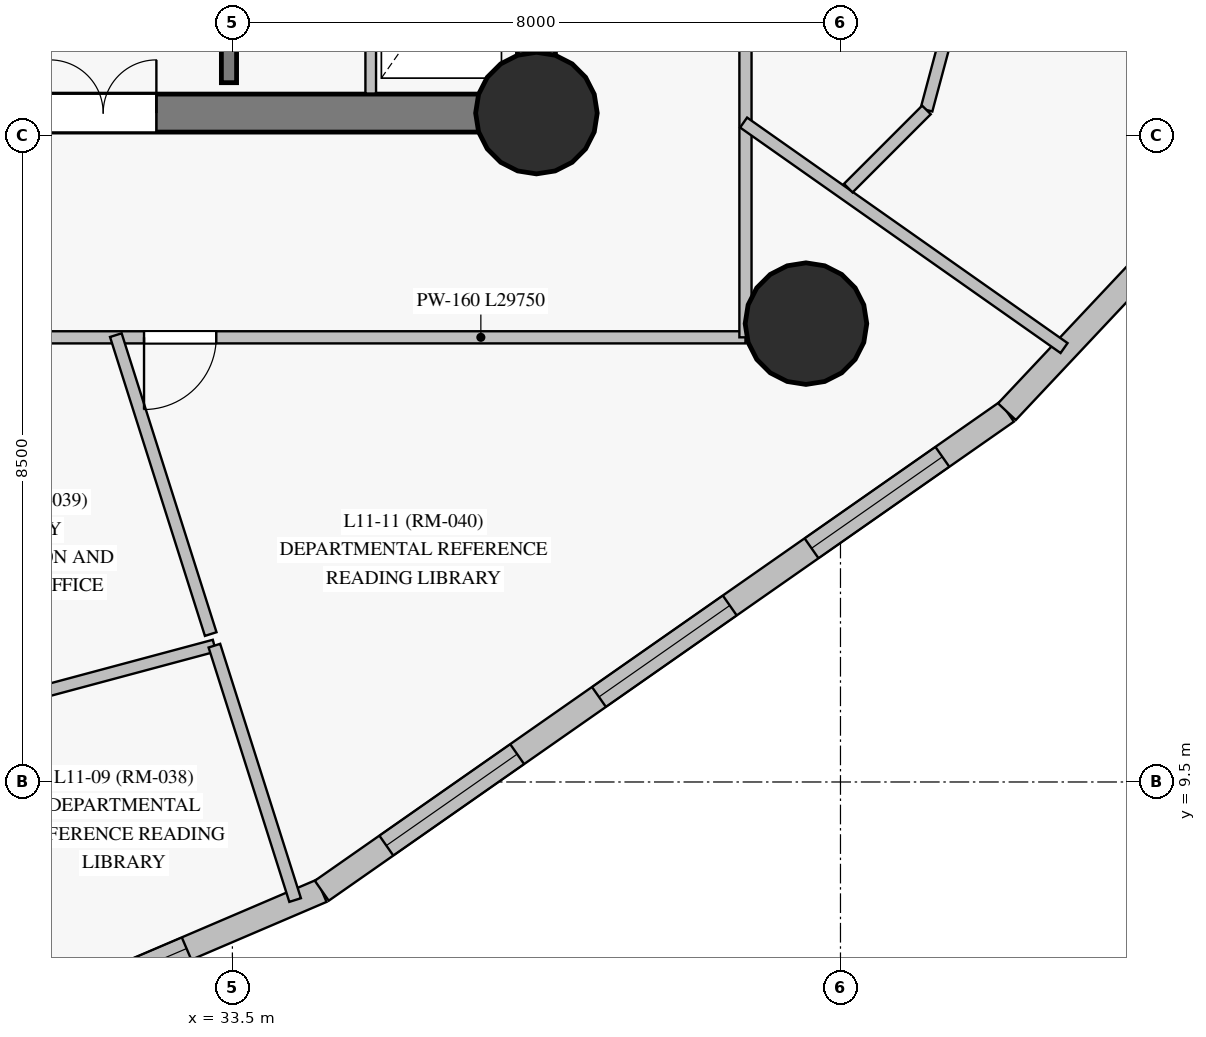
"""IFC4 building model, lengths in metres.
Left out: names, types, materials, properties, quantities, classifications, styles, units other than length and angle.
Written with IfcOpenShell. Run it as: python <this file> out.ifc"""

import sys

from ifc_helpers import new_model, si_unit, direction, frame, frame_2d, origin, origin_with_axes, origin_2d, place, context, subcontext, project, spatial, rectangle, circle, extrude, source, transform, mapped, element, fill, save


model = new_model("IFC4")
c1 = context("Model", 3, precision=1e-05, world=origin(), true_north=direction((0.0, 1.0)))
c2 = subcontext(c1, "Body", "Model", "MODEL_VIEW")
j1 = project(units=[si_unit("LENGTHUNIT", "METRE"), si_unit("PLANEANGLEUNIT", "RADIAN")], contexts=[c1])
p1 = place(None, origin())
s1 = spatial("IfcSite", under=j1, at=p1, CompositionType="ELEMENT")
p2 = place(p1, origin())
s2 = spatial("IfcBuilding", under=s1, at=p2, CompositionType="ELEMENT")
p3 = place(p2, frame((0.0, 0.0, 44.5)))
s3 = spatial("IfcBuildingStorey", under=s2, at=p3, CompositionType="ELEMENT", Elevation=44.5)
p4 = place(p3, frame((26.55, 18.3, 0.0), z_axis=(0.0, 0.0, 1.0), x_axis=(1.0, 0.0, 0.0)))
e1 = element("IfcWall", 1, at=p4, inside=s3, PredefinedType="SHEAR", context=c2, shape_type="SweptSolid", body=[
    extrude(rectangle(XDim=10.95, YDim=0.5, at=frame_2d((5.475, 0.0))), origin(), (0.0, 0.0, 1.0), 3.35),
])
p5 = place(p4, frame((4.55, 0.0, 0.0)))
e2 = element("IfcOpeningElement", 2, at=p5, cuts=e1, PredefinedType="OPENING", context=c2, shape_type="SweptSolid", body=[
    extrude(rectangle(XDim=1.4, YDim=2.2, at=frame_2d((0.7, 1.1))), frame((0.0, 0.26, 0.0), z_axis=(0.0, -1.0, 0.0), x_axis=(1.0, 0.0, 0.0)), (0.0, 0.0, 1.0), 0.52),
])
p6 = place(p3, frame((37.5, 18.3, 0.0), z_axis=(0.0, 0.0, 1.0), x_axis=(0.0, 1.0, 0.0)))
e3 = element("IfcWall", 3, at=p6, inside=s3, PredefinedType="SHEAR", context=c2, shape_type="SweptSolid", body=[
    extrude(rectangle(XDim=16.4, YDim=0.5, at=frame_2d((8.2, 0.0))), origin(), (0.0, 0.0, 1.0), 3.35),
])
p7 = place(p6, frame((14.06, 0.0, 0.0)))
e4 = element("IfcOpeningElement", 4, at=p7, cuts=e3, PredefinedType="OPENING", context=c2, shape_type="SweptSolid", body=[
    extrude(rectangle(XDim=1.2, YDim=2.15, at=frame_2d((0.6, 1.075))), frame((0.0, 0.26, 0.0), z_axis=(0.0, -1.0, 0.0), x_axis=(1.0, 0.0, 0.0)), (0.0, 0.0, 1.0), 0.52),
])
m1 = source(origin_with_axes(), c2, "Body", "SweptSolid", [
    extrude(circle(Radius=0.8, at=origin_2d()), origin(), (0.0, 0.0, 1.0), 3.6),
])
for number, where, z_axis, x_axis in (
    (5, (37.5, 18.3, 0.0), (0.0, 0.0, 1.0), (1.0, 0.0, 0.0)),
    (6, (41.046, 15.53, 0.0), (0.0, 0.0, 1.0), (1.0, 0.0, 0.0)),
):
    element("IfcColumn", number, at=place(p3, frame(where, z_axis=z_axis, x_axis=x_axis)), inside=s3, PredefinedType="COLUMN", context=c2, shape_type="MappedRepresentation", body=[
        mapped(m1, transform((0.0, 0.0, 0.0), scale=1.0)),
    ])
p8 = place(p3, frame((25.104, 3.976, 0.0), z_axis=(0.0, 0.0, 1.0), x_axis=(0.919450427294, 0.393205940634, 0.0)))
e7 = element("IfcWall", 7, at=p8, inside=s3, PredefinedType="SOLIDWALL", context=c2, shape_type="SweptSolid", body=[
    extrude(rectangle(XDim=10.411, YDim=0.32, at=frame_2d((5.205, 0.0))), origin(), (0.0, 0.0, 1.0), 3.02),
])
p9 = place(p8, frame((6.376, 0.0, 0.85)))
e8 = element("IfcOpeningElement", 8, at=p9, cuts=e7, PredefinedType="OPENING", context=c2, shape_type="SweptSolid", body=[
    extrude(rectangle(XDim=2.1, YDim=1.95, at=frame_2d((1.05, 0.975))), frame((0.0, 0.17, 0.0), z_axis=(0.0, -1.0, 0.0), x_axis=(1.0, 0.0, 0.0)), (0.0, 0.0, 1.0), 0.34),
])
p10 = place(p3, frame((34.676, 8.069, 0.0), z_axis=(0.0, 0.0, 1.0), x_axis=(0.81955194261, 0.573004898203, 0.0)))
e9 = element("IfcWall", 9, at=p10, inside=s3, PredefinedType="SOLIDWALL", context=c2, shape_type="SweptSolid", body=[
    extrude(rectangle(XDim=10.999, YDim=0.32, at=frame_2d((5.499, 0.0))), origin(), (0.0, 0.0, 1.0), 3.35),
])
p11 = place(p10, frame((1.036, 0.0, 0.85)))
e10 = element("IfcOpeningElement", 10, at=p11, cuts=e9, PredefinedType="OPENING", context=c2, shape_type="SweptSolid", body=[
    extrude(rectangle(XDim=2.1, YDim=1.95, at=frame_2d((1.05, 0.975))), frame((0.0, 0.17, 0.0), z_axis=(0.0, -1.0, 0.0), x_axis=(1.0, 0.0, 0.0)), (0.0, 0.0, 1.0), 0.34),
])
p12 = place(p10, frame((4.449, 0.0, 0.85)))
e11 = element("IfcOpeningElement", 11, at=p12, cuts=e9, PredefinedType="OPENING", context=c2, shape_type="SweptSolid", body=[
    extrude(rectangle(XDim=2.1, YDim=1.95, at=frame_2d((1.05, 0.975))), frame((0.0, 0.17, 0.0), z_axis=(0.0, -1.0, 0.0), x_axis=(1.0, 0.0, 0.0)), (0.0, 0.0, 1.0), 0.34),
])
p13 = place(p10, frame((7.862, 0.0, 0.85)))
e12 = element("IfcOpeningElement", 12, at=p13, cuts=e9, PredefinedType="OPENING", context=c2, shape_type="SweptSolid", body=[
    extrude(rectangle(XDim=2.1, YDim=1.95, at=frame_2d((1.05, 0.975))), frame((0.0, 0.17, 0.0), z_axis=(0.0, -1.0, 0.0), x_axis=(1.0, 0.0, 0.0)), (0.0, 0.0, 1.0), 0.34),
])
p14 = place(p3, frame((43.69, 14.372, 0.0), z_axis=(0.0, 0.0, 1.0), x_axis=(0.684991460833, 0.728551095384, 0.0)))
e13 = element("IfcWall", 13, at=p14, inside=s3, PredefinedType="SOLIDWALL", context=c2, shape_type="SweptSolid", body=[
    extrude(rectangle(XDim=15.817, YDim=0.32, at=frame_2d((7.908, 0.0))), origin(), (0.0, 0.0, 1.0), 3.35),
])
p15 = place(p14, frame((2.928, 0.0, 0.85)))
e14 = element("IfcOpeningElement", 14, at=p15, cuts=e13, PredefinedType="OPENING", context=c2, shape_type="SweptSolid", body=[
    extrude(rectangle(XDim=2.1, YDim=1.95, at=frame_2d((1.05, 0.975))), frame((0.0, 0.17, 0.0), z_axis=(0.0, -1.0, 0.0), x_axis=(1.0, 0.0, 0.0)), (0.0, 0.0, 1.0), 0.34),
])
p16 = place(p14, frame((8.004, 0.0, 0.85)))
e15 = element("IfcOpeningElement", 15, at=p16, cuts=e13, PredefinedType="OPENING", context=c2, shape_type="SweptSolid", body=[
    extrude(rectangle(XDim=2.1, YDim=1.95, at=frame_2d((1.05, 0.975))), frame((0.0, 0.17, 0.0), z_axis=(0.0, -1.0, 0.0), x_axis=(1.0, 0.0, 0.0)), (0.0, 0.0, 1.0), 0.34),
])
p17 = place(p14, frame((12.784, 0.0, 0.85)))
e16 = element("IfcOpeningElement", 16, at=p17, cuts=e13, PredefinedType="OPENING", context=c2, shape_type="SweptSolid", body=[
    extrude(rectangle(XDim=2.1, YDim=1.95, at=frame_2d((1.05, 0.975))), frame((0.0, 0.17, 0.0), z_axis=(0.0, -1.0, 0.0), x_axis=(1.0, 0.0, 0.0)), (0.0, 0.0, 1.0), 0.34),
])
p18 = place(p3, frame((33.455, 18.7, 0.0), z_axis=(0.0, 0.0, 1.0), x_axis=(0.0, 1.0, 0.0)))
e17 = element("IfcWall", 17, at=p18, inside=s3, PredefinedType="SHEAR", context=c2, shape_type="SweptSolid", body=[
    extrude(rectangle(XDim=15.6, YDim=0.2, at=frame_2d((7.8, 0.0))), origin(), (0.0, 0.0, 1.0), 3.35),
])
p19 = place(p18, frame((2.75, 0.0, 0.0)))
e18 = element("IfcOpeningElement", 18, at=p19, cuts=e17, PredefinedType="OPENING", context=c2, shape_type="SweptSolid", body=[
    extrude(rectangle(XDim=1.15, YDim=2.15, at=frame_2d((0.575, 1.075))), frame((0.0, 0.11, 0.0), z_axis=(0.0, -1.0, 0.0), x_axis=(1.0, 0.0, 0.0)), (0.0, 0.0, 1.0), 0.22),
])
p20 = place(p18, frame((0.55, 0.0, 0.0)))
e19 = element("IfcOpeningElement", 19, at=p20, cuts=e17, PredefinedType="OPENING", context=c2, shape_type="SweptSolid", body=[
    extrude(rectangle(XDim=0.94, YDim=2.1, at=frame_2d((0.47, 1.05))), frame((0.0, 0.11, 0.0), z_axis=(0.0, -1.0, 0.0), x_axis=(1.0, 0.0, 0.0)), (0.0, 0.0, 1.0), 0.22),
])
p21 = place(p3, frame((40.25, 15.35, 0.0), z_axis=(0.0, 0.0, 1.0), x_axis=(-1.0, 0.0, 0.0)))
e20 = element("IfcWall", 20, at=p21, inside=s3, PredefinedType="PARTITIONING", context=c2, shape_type="SweptSolid", body=[
    extrude(rectangle(XDim=29.75, YDim=0.16, at=frame_2d((14.875, 0.0))), origin(), (0.0, 0.0, 1.0), 2.7),
])
p22 = place(p21, frame((26.423, 0.0, 0.0)))
e21 = element("IfcOpeningElement", 21, at=p22, cuts=e20, PredefinedType="OPENING", context=c2, shape_type="SweptSolid", body=[
    extrude(rectangle(XDim=0.95, YDim=2.15, at=frame_2d((0.475, 1.075))), frame((0.0, 0.09, 0.0), z_axis=(0.0, -1.0, 0.0), x_axis=(1.0, 0.0, 0.0)), (0.0, 0.0, 1.0), 0.18),
])
p23 = place(p21, frame((21.837, 0.0, 0.0)))
e22 = element("IfcOpeningElement", 22, at=p23, cuts=e20, PredefinedType="OPENING", context=c2, shape_type="SweptSolid", body=[
    extrude(rectangle(XDim=0.95, YDim=2.15, at=frame_2d((0.475, 1.075))), frame((0.0, 0.09, 0.0), z_axis=(0.0, -1.0, 0.0), x_axis=(1.0, 0.0, 0.0)), (0.0, 0.0, 1.0), 0.18),
])
p24 = place(p21, frame((18.863, 0.0, 0.0)))
e23 = element("IfcOpeningElement", 23, at=p24, cuts=e20, PredefinedType="OPENING", context=c2, shape_type="SweptSolid", body=[
    extrude(rectangle(XDim=0.95, YDim=2.15, at=frame_2d((0.475, 1.075))), frame((0.0, 0.09, 0.0), z_axis=(0.0, -1.0, 0.0), x_axis=(1.0, 0.0, 0.0)), (0.0, 0.0, 1.0), 0.18),
])
p25 = place(p21, frame((16.388, 0.0, 0.0)))
e24 = element("IfcOpeningElement", 24, at=p25, cuts=e20, PredefinedType="OPENING", context=c2, shape_type="SweptSolid", body=[
    extrude(rectangle(XDim=0.95, YDim=2.15, at=frame_2d((0.475, 1.075))), frame((0.0, 0.09, 0.0), z_axis=(0.0, -1.0, 0.0), x_axis=(1.0, 0.0, 0.0)), (0.0, 0.0, 1.0), 0.18),
])
p26 = place(p21, frame((14.4, 0.0, 0.0)))
e25 = element("IfcOpeningElement", 25, at=p26, cuts=e20, PredefinedType="OPENING", context=c2, shape_type="SweptSolid", body=[
    extrude(rectangle(XDim=0.95, YDim=2.15, at=frame_2d((0.475, 1.075))), frame((0.0, 0.09, 0.0), z_axis=(0.0, -1.0, 0.0), x_axis=(1.0, 0.0, 0.0)), (0.0, 0.0, 1.0), 0.18),
])
p27 = place(p21, frame((12.118, 0.0, 0.0)))
e26 = element("IfcOpeningElement", 26, at=p27, cuts=e20, PredefinedType="OPENING", context=c2, shape_type="SweptSolid", body=[
    extrude(rectangle(XDim=0.95, YDim=2.15, at=frame_2d((0.475, 1.075))), frame((0.0, 0.09, 0.0), z_axis=(0.0, -1.0, 0.0), x_axis=(1.0, 0.0, 0.0)), (0.0, 0.0, 1.0), 0.18),
])
p28 = place(p21, frame((9.938, 0.0, 0.0)))
e27 = element("IfcOpeningElement", 27, at=p28, cuts=e20, PredefinedType="OPENING", context=c2, shape_type="SweptSolid", body=[
    extrude(rectangle(XDim=0.95, YDim=2.15, at=frame_2d((0.475, 1.075))), frame((0.0, 0.09, 0.0), z_axis=(0.0, -1.0, 0.0), x_axis=(1.0, 0.0, 0.0)), (0.0, 0.0, 1.0), 0.18),
])
p29 = place(p21, frame((6.962, 0.0, 0.0)))
e28 = element("IfcOpeningElement", 28, at=p29, cuts=e20, PredefinedType="OPENING", context=c2, shape_type="SweptSolid", body=[
    extrude(rectangle(XDim=0.95, YDim=2.15, at=frame_2d((0.475, 1.075))), frame((0.0, 0.09, 0.0), z_axis=(0.0, -1.0, 0.0), x_axis=(1.0, 0.0, 0.0)), (0.0, 0.0, 1.0), 0.18),
])
p30 = place(p3, frame((40.25, 37.65, 0.0), z_axis=(0.0, 0.0, 1.0), x_axis=(0.0, -1.0, 0.0)))
e29 = element("IfcWall", 29, at=p30, inside=s3, PredefinedType="PARTITIONING", context=c2, shape_type="SweptSolid", body=[
    extrude(rectangle(XDim=22.3, YDim=0.16, at=frame_2d((11.15, 0.0))), origin(), (0.0, 0.0, 1.0), 2.75),
])
p31 = place(p30, frame((14.02, 0.0, 0.0)))
e30 = element("IfcOpeningElement", 30, at=p31, cuts=e29, PredefinedType="OPENING", context=c2, shape_type="SweptSolid", body=[
    extrude(rectangle(XDim=0.95, YDim=2.15, at=frame_2d((0.475, 1.075))), frame((0.0, 0.09, 0.0), z_axis=(0.0, -1.0, 0.0), x_axis=(1.0, 0.0, 0.0)), (0.0, 0.0, 1.0), 0.18),
])
p32 = place(p30, frame((11.115, 0.0, 0.0)))
e31 = element("IfcOpeningElement", 31, at=p32, cuts=e29, PredefinedType="OPENING", context=c2, shape_type="SweptSolid", body=[
    extrude(rectangle(XDim=0.95, YDim=2.15, at=frame_2d((0.475, 1.075))), frame((0.0, 0.09, 0.0), z_axis=(0.0, -1.0, 0.0), x_axis=(1.0, 0.0, 0.0)), (0.0, 0.0, 1.0), 0.18),
])
p33 = place(p30, frame((7.397, 0.0, 0.0)))
e32 = element("IfcOpeningElement", 32, at=p33, cuts=e29, PredefinedType="OPENING", context=c2, shape_type="SweptSolid", body=[
    extrude(rectangle(XDim=0.86, YDim=2.1, at=frame_2d((0.43, 1.05))), frame((0.0, 0.09, 0.0), z_axis=(0.0, -1.0, 0.0), x_axis=(1.0, 0.0, 0.0)), (0.0, 0.0, 1.0), 0.18),
])
p34 = place(p30, frame((4.09, 0.0, 0.0)))
e33 = element("IfcOpeningElement", 33, at=p34, cuts=e29, PredefinedType="OPENING", context=c2, shape_type="SweptSolid", body=[
    extrude(rectangle(XDim=0.95, YDim=2.15, at=frame_2d((0.475, 1.075))), frame((0.0, 0.09, 0.0), z_axis=(0.0, -1.0, 0.0), x_axis=(1.0, 0.0, 0.0)), (0.0, 0.0, 1.0), 0.18),
])
p35 = place(p30, frame((2.96, 0.0, 0.0)))
e34 = element("IfcOpeningElement", 34, at=p35, cuts=e29, PredefinedType="OPENING", context=c2, shape_type="SweptSolid", body=[
    extrude(rectangle(XDim=0.95, YDim=2.15, at=frame_2d((0.475, 1.075))), frame((0.0, 0.09, 0.0), z_axis=(0.0, -1.0, 0.0), x_axis=(1.0, 0.0, 0.0)), (0.0, 0.0, 1.0), 0.18),
])
p36 = place(p30, frame((0.681, 0.0, 0.0)))
e35 = element("IfcOpeningElement", 35, at=p36, cuts=e29, PredefinedType="OPENING", context=c2, shape_type="SweptSolid", body=[
    extrude(rectangle(XDim=0.95, YDim=2.15, at=frame_2d((0.475, 1.075))), frame((0.0, 0.09, 0.0), z_axis=(0.0, -1.0, 0.0), x_axis=(1.0, 0.0, 0.0)), (0.0, 0.0, 1.0), 0.18),
])
p37 = place(p30, frame((15.145, 0.0, 0.0)))
e36 = element("IfcOpeningElement", 36, at=p37, cuts=e29, PredefinedType="OPENING", context=c2, shape_type="SweptSolid", body=[
    extrude(rectangle(XDim=0.95, YDim=2.15, at=frame_2d((0.475, 1.075))), frame((0.0, 0.09, 0.0), z_axis=(0.0, -1.0, 0.0), x_axis=(1.0, 0.0, 0.0)), (0.0, 0.0, 1.0), 0.18),
])
p38 = place(p30, frame((9.752, 0.0, 0.0)))
e37 = element("IfcOpeningElement", 37, at=p38, cuts=e29, PredefinedType="OPENING", context=c2, shape_type="SweptSolid", body=[
    extrude(rectangle(XDim=0.86, YDim=2.04, at=frame_2d((0.43, 1.02))), frame((0.0, 0.09, 0.0), z_axis=(0.0, -1.0, 0.0), x_axis=(1.0, 0.0, 0.0)), (0.0, 0.0, 1.0), 0.18),
])
p39 = place(p3, frame((44.197, 24.187, 0.0), z_axis=(0.0, 0.0, 1.0), x_axis=(-0.258810027393, -0.965928242532, 0.0)))
e38 = element("IfcWall", 38, at=p39, inside=s3, PredefinedType="PARTITIONING", context=c2, shape_type="SweptSolid", body=[
    extrude(rectangle(XDim=6.052, YDim=0.16, at=frame_2d((3.026, 0.0))), origin(), (0.0, 0.0, 1.0), 2.75),
])
p40 = place(p39, frame((1.511, 0.0, 0.0)))
e39 = element("IfcOpeningElement", 39, at=p40, cuts=e38, PredefinedType="OPENING", context=c2, shape_type="SweptSolid", body=[
    extrude(rectangle(XDim=0.95, YDim=2.15, at=frame_2d((0.475, 1.075))), frame((0.0, 0.09, 0.0), z_axis=(0.0, -1.0, 0.0), x_axis=(1.0, 0.0, 0.0)), (0.0, 0.0, 1.0), 0.18),
])
p41 = place(p3, frame((40.226, 18.176, 0.0), z_axis=(0.0, 0.0, 1.0), x_axis=(0.817812197712, -0.575485194661, 0.0)))
e40 = element("IfcWall", 40, at=p41, inside=s3, PredefinedType="PARTITIONING", context=c2, shape_type="SweptSolid", body=[
    extrude(rectangle(XDim=5.155, YDim=0.16, at=frame_2d((2.578, 0.0))), origin(), (0.0, 0.0, 1.0), 3.35),
])
p42 = place(p3, frame((28.905, 10.126, 0.0), z_axis=(0.0, 0.0, 1.0), x_axis=(0.965928004667, 0.258810915149, 0.0)))
e41 = element("IfcWall", 41, at=p42, inside=s3, PredefinedType="PARTITIONING", context=c2, shape_type="SweptSolid", body=[
    extrude(rectangle(XDim=4.512, YDim=0.16, at=frame_2d((2.256, 0.0))), origin(), (0.0, 0.0, 1.0), 2.75),
])
p43 = place(p3, frame((31.967, 15.379, 0.0), z_axis=(0.0, 0.0, 1.0), x_axis=(0.302490392513, -0.953152433999, 0.0)))
e42 = element("IfcWall", 42, at=p43, inside=s3, PredefinedType="PARTITIONING", context=c2, shape_type="SweptSolid", body=[
    extrude(rectangle(XDim=4.126, YDim=0.16, at=frame_2d((2.063, 0.0))), origin(), (0.0, 0.0, 1.0), 3.35),
])
p44 = place(p3, frame((33.263, 11.293, 0.0), z_axis=(0.0, 0.0, 1.0), x_axis=(0.302468838767, -0.953159273981, 0.0)))
e43 = element("IfcWall", 43, at=p44, inside=s3, PredefinedType="PARTITIONING", context=c2, shape_type="SweptSolid", body=[
    extrude(rectangle(XDim=3.511, YDim=0.16, at=frame_2d((1.756, 0.0))), origin(), (0.0, 0.0, 1.0), 3.35),
])
p45 = place(p3, frame((35.32, 18.557, 0.0), z_axis=(0.0, 0.0, 1.0), x_axis=(0.0, 1.0, 0.0)))
e44 = element("IfcWall", 44, at=p45, inside=s3, PredefinedType="PARTITIONING", context=c2, shape_type="SweptSolid", body=[
    extrude(rectangle(XDim=2.553, YDim=0.14, at=frame_2d((1.277, 0.0))), origin(), (0.0, 0.0, 1.0), 3.35),
])
p46 = place(p3, frame((42.631, 18.341, 0.0), z_axis=(0.0, 0.0, 1.0), x_axis=(-0.707190705793, -0.707022846618, 0.0)))
e45 = element("IfcWall", 45, at=p46, inside=s3, PredefinedType="PARTITIONING", context=c2, shape_type="SweptSolid", body=[
    extrude(rectangle(XDim=1.454, YDim=0.16, at=frame_2d((0.727, 0.0))), origin(), (0.0, 0.0, 1.0), 2.75),
])
m2 = source(origin_with_axes(), c2, "Body", "SweptSolid", [
    extrude(rectangle(XDim=2.1, YDim=1.95, at=frame_2d((1.05, 0.975))), frame((0.0, 0.03, 0.0), z_axis=(0.0, -1.0, 0.0), x_axis=(1.0, 0.0, 0.0)), (0.0, 0.0, 1.0), 0.06),
])
p47 = place(p9, origin())
e46 = element("IfcWindow", 46, at=p47, inside=s3, PartitioningType="SINGLE_PANEL", PredefinedType="WINDOW", context=c2, shape_type="MappedRepresentation", body=[
    mapped(m2, transform((0.0, 0.0, 0.0), scale=1.0)),
])
fill(e8, e46)
p48 = place(p11, origin())
e47 = element("IfcWindow", 47, at=p48, inside=s3, PartitioningType="SINGLE_PANEL", PredefinedType="WINDOW", context=c2, shape_type="MappedRepresentation", body=[
    mapped(m2, transform((0.0, 0.0, 0.0), scale=1.0)),
])
fill(e10, e47)
p49 = place(p12, origin())
e48 = element("IfcWindow", 48, at=p49, inside=s3, PartitioningType="SINGLE_PANEL", PredefinedType="WINDOW", context=c2, shape_type="MappedRepresentation", body=[
    mapped(m2, transform((0.0, 0.0, 0.0), scale=1.0)),
])
fill(e11, e48)
p50 = place(p13, origin())
e49 = element("IfcWindow", 49, at=p50, inside=s3, PartitioningType="SINGLE_PANEL", PredefinedType="WINDOW", context=c2, shape_type="MappedRepresentation", body=[
    mapped(m2, transform((0.0, 0.0, 0.0), scale=1.0)),
])
fill(e12, e49)
m3 = source(origin_with_axes(), c2, "Body", "SweptSolid", [
    extrude(rectangle(XDim=1.4, YDim=2.2, at=frame_2d((0.7, 1.1))), frame((0.0, 0.025, 0.0), z_axis=(0.0, -1.0, 0.0), x_axis=(1.0, 0.0, 0.0)), (0.0, 0.0, 1.0), 0.05),
])
p51 = place(p5, origin())
e50 = element("IfcDoor", 50, at=p51, inside=s3, OperationType="DOUBLE_DOOR_SINGLE_SWING", PredefinedType="DOOR", context=c2, shape_type="MappedRepresentation", body=[
    mapped(m3, transform((0.0, 0.0, 0.0), scale=1.0)),
])
fill(e2, e50)
m4 = source(origin_with_axes(), c2, "Body", "SweptSolid", [
    extrude(rectangle(XDim=0.95, YDim=2.15, at=frame_2d((0.475, 1.075))), frame((0.0, 0.025, 0.0), z_axis=(0.0, -1.0, 0.0), x_axis=(1.0, 0.0, 0.0)), (0.0, 0.0, 1.0), 0.05),
])
p52 = place(p29, origin())
e51 = element("IfcDoor", 51, at=p52, inside=s3, OperationType="SINGLE_SWING_RIGHT", PredefinedType="DOOR", context=c2, shape_type="MappedRepresentation", body=[
    mapped(m4, transform((0.0, 0.0, 0.0), scale=1.0)),
])
fill(e28, e51)
save(model, sys.argv[1])
